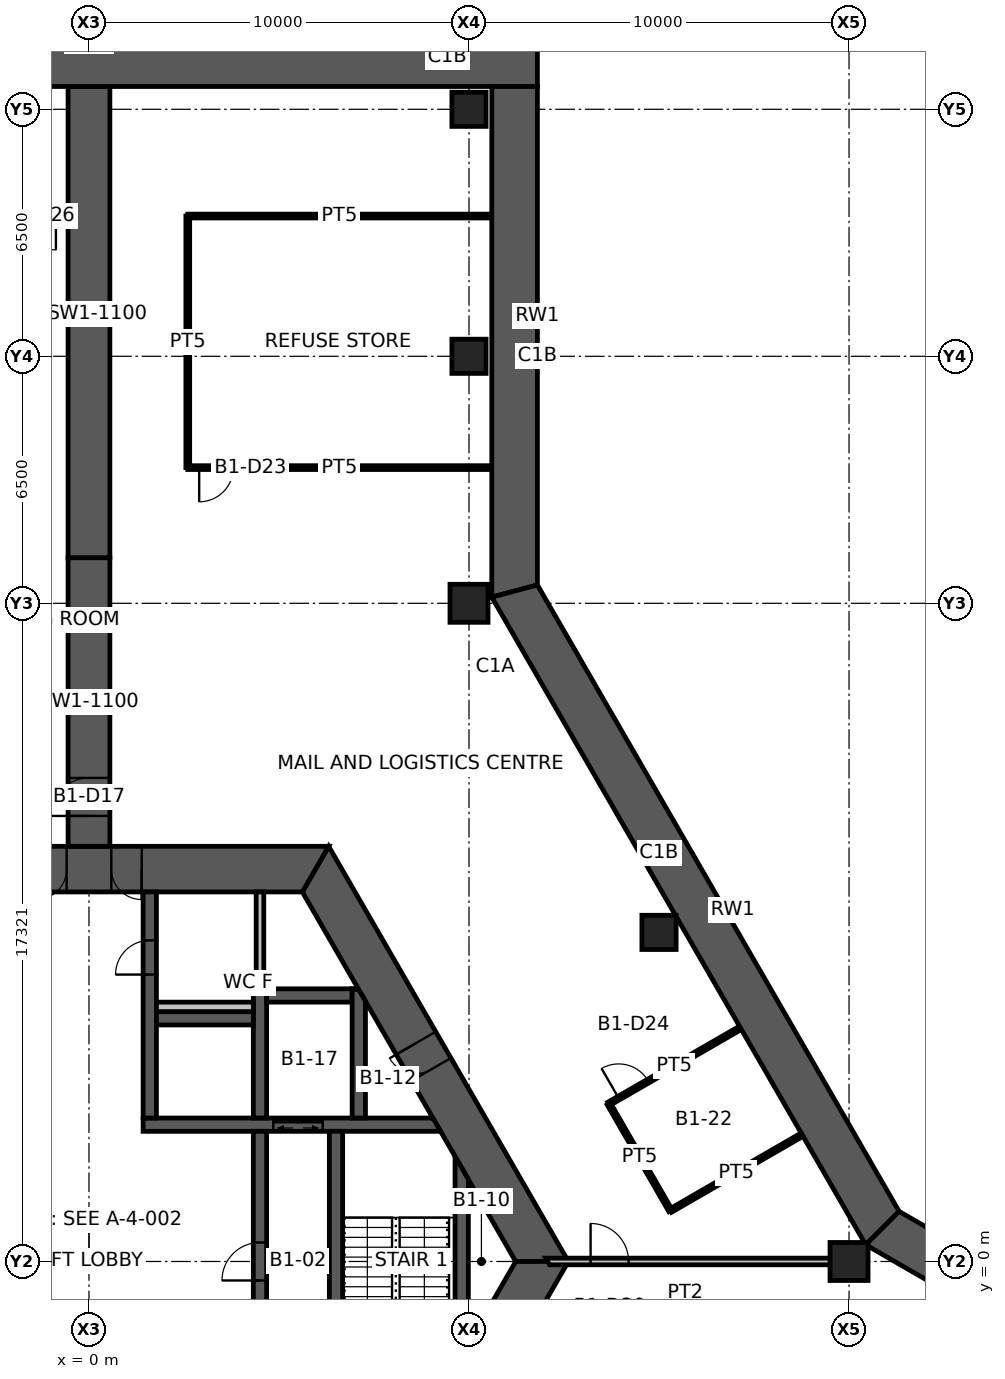
"""IFC4 building model, lengths in metres.
Left out: names, types, materials, properties, quantities, classifications, styles, units other than length and angle.
Written with IfcOpenShell. Run it as: python <this file> out.ifc"""

import sys

from ifc_helpers import new_model, si_unit, direction, frame, frame_2d, origin, origin_2d, place, context, subcontext, project, spatial, polyline, rectangle, hollow_rectangle, outline, extrude, element, fill, save


model = new_model("IFC4")
c1 = context("Model", 3, precision=1e-05, world=origin(), true_north=direction((0.0, 1.0)))
c2 = subcontext(c1, "Body", "Model", "MODEL_VIEW")
j1 = project(units=[si_unit("LENGTHUNIT", "METRE"), si_unit("PLANEANGLEUNIT", "RADIAN")], contexts=[c1])
p1 = place(None, origin())
s1 = spatial("IfcSite", under=j1, at=p1, CompositionType="ELEMENT")
p2 = place(p1, origin())
s2 = spatial("IfcBuilding", under=s1, at=p2, CompositionType="ELEMENT")
p3 = place(p2, frame((0.0, 0.0, -5.0)))
s3 = spatial("IfcBuildingStorey", under=s2, at=p3, CompositionType="ELEMENT", Elevation=-5.0)
for number, where, z_axis, x_axis in (
    (1, (20.0, 0.0, 0.0), (0.0, 0.0, 1.0), (1.0, 0.0, 0.0)),
    (2, (10.0, 17.321, 0.0), (0.0, 0.0, 1.0), (1.0, 0.0, 0.0)),
):
    element("IfcColumn", number, at=place(p3, frame(where, z_axis=z_axis, x_axis=x_axis)), inside=s3, PredefinedType="COLUMN", context=c2, shape_type="SweptSolid", body=[
        extrude(hollow_rectangle(XDim=1.0, YDim=1.0, WallThickness=0.06, at=origin_2d()), origin(), (0.0, 0.0, 1.0), 5.0),
    ])
for number, where, z_axis, x_axis in (
    (3, (15.0, 8.66, 0.0), (0.0, 0.0, 1.0), (1.0, 0.0, 0.0)),
    (4, (10.0, 23.821, 0.0), (0.0, 0.0, 1.0), (1.0, 0.0, 0.0)),
    (5, (10.0, 30.321, 0.0), (0.0, 0.0, 1.0), (1.0, 0.0, 0.0)),
):
    element("IfcColumn", number, at=place(p3, frame(where, z_axis=z_axis, x_axis=x_axis)), inside=s3, PredefinedType="COLUMN", context=c2, shape_type="SweptSolid", body=[
        extrude(hollow_rectangle(XDim=0.9, YDim=0.9, WallThickness=0.05, at=origin_2d()), origin(), (0.0, 0.0, 1.0), 5.0),
    ])
p4 = place(p3, frame((11.922, 0.0, 0.0), z_axis=(0.0, 0.0, 1.0), x_axis=(-0.500004296715, 0.866022923061, 0.0)))
e6 = element("IfcWall", 6, at=p4, inside=s3, PredefinedType="SHEAR", context=c2, shape_type="SweptSolid", body=[
    extrude(outline(polyline([(-0.346, -0.6), (5.835, -0.6), (6.635, -0.6), (12.269, -0.6), (11.576, 0.6), (6.635, 0.6), (5.835, 0.6), (0.346, 0.6), (-0.346, -0.6)])), origin(), (0.0, 0.0, 1.0), 5.0),
])
p5 = place(p4, frame((5.835, 0.0, 0.0)))
e7 = element("IfcOpeningElement", 7, at=p5, cuts=e6, PredefinedType="OPENING", context=c2, shape_type="SweptSolid", body=[
    extrude(rectangle(XDim=0.8, YDim=2.1, at=frame_2d((0.4, 1.05))), frame((0.0, 0.61, 0.0), z_axis=(0.0, -1.0, 0.0), x_axis=(1.0, 0.0, 0.0)), (0.0, 0.0, 1.0), 1.22),
])
p6 = place(p3, frame((5.961, 10.325, 0.0), z_axis=(0.0, 0.0, 1.0), x_axis=(-1.0, 0.0, 0.0)))
e8 = element("IfcWall", 8, at=p6, inside=s3, PredefinedType="SHEAR", context=c2, shape_type="SweptSolid", body=[
    extrude(outline(polyline([(-0.346, -0.6), (4.574, -0.6), (5.374, -0.6), (6.549, -0.6), (7.349, -0.6), (12.269, -0.6), (11.576, 0.6), (7.349, 0.6), (6.549, 0.6), (5.374, 0.6), (4.574, 0.6), (0.346, 0.6), (-0.346, -0.6)])), origin(), (0.0, 0.0, 1.0), 5.0),
])
p7 = place(p6, frame((6.549, 0.0, 0.0)))
e9 = element("IfcOpeningElement", 9, at=p7, cuts=e8, PredefinedType="OPENING", context=c2, shape_type="SweptSolid", body=[
    extrude(rectangle(XDim=0.8, YDim=2.1, at=frame_2d((0.4, 1.05))), frame((0.0, 0.61, 0.0), z_axis=(0.0, -1.0, 0.0), x_axis=(1.0, 0.0, 0.0)), (0.0, 0.0, 1.0), 1.22),
])
p8 = place(p6, frame((4.574, 0.0, 0.0)))
e10 = element("IfcOpeningElement", 10, at=p8, cuts=e8, PredefinedType="OPENING", context=c2, shape_type="SweptSolid", body=[
    extrude(rectangle(XDim=0.8, YDim=2.1, at=frame_2d((0.4, 1.05))), frame((0.0, 0.61, 0.0), z_axis=(0.0, -1.0, 0.0), x_axis=(1.0, 0.0, 0.0)), (0.0, 0.0, 1.0), 1.22),
])
p9 = place(p3, frame((5.961, -10.325, 0.0), z_axis=(0.0, 0.0, 1.0), x_axis=(0.500004296715, 0.866022923061, 0.0)))
e11 = element("IfcWall", 11, at=p9, inside=s3, PredefinedType="SHEAR", context=c2, shape_type="SweptSolid", body=[
    extrude(outline(polyline([(-0.346, -0.6), (3.208, -0.6), (4.009, -0.6), (12.269, -0.6), (11.576, 0.6), (4.009, 0.6), (3.208, 0.6), (0.346, 0.6), (-0.346, -0.6)])), origin(), (0.0, 0.0, 1.0), 5.0),
])
p10 = place(p9, frame((3.208, 0.0, 0.0)))
e12 = element("IfcOpeningElement", 12, at=p10, cuts=e11, PredefinedType="OPENING", context=c2, shape_type="SweptSolid", body=[
    extrude(rectangle(XDim=0.8, YDim=2.1, at=frame_2d((0.4, 1.05))), frame((0.0, 0.61, 0.0), z_axis=(0.0, -1.0, 0.0), x_axis=(1.0, 0.0, 0.0)), (0.0, 0.0, 1.0), 1.22),
])
p11 = place(p3, frame((0.0, 10.925, 0.0), z_axis=(0.0, 0.0, 1.0), x_axis=(0.0, 1.0, 0.0)))
e13 = element("IfcWall", 13, at=p11, inside=s3, PredefinedType="SHEAR", context=c2, shape_type="SweptSolid", body=[
    extrude(rectangle(XDim=7.595, YDim=1.1, at=frame_2d((3.798, 0.0))), origin(), (0.0, 0.0, 1.0), 5.0),
])
p12 = place(p11, frame((0.8, 0.0, 0.0)))
e14 = element("IfcOpeningElement", 14, at=p12, cuts=e13, PredefinedType="OPENING", context=c2, shape_type="SweptSolid", body=[
    extrude(rectangle(XDim=1.0, YDim=2.1, at=frame_2d((0.5, 1.05))), frame((0.0, 0.56, 0.0), z_axis=(0.0, -1.0, 0.0), x_axis=(1.0, 0.0, 0.0)), (0.0, 0.0, 1.0), 1.12),
])
p13 = place(p3, frame((0.0, 18.521, 0.0), z_axis=(0.0, 0.0, 1.0), x_axis=(0.0, 1.0, 0.0)))
e15 = element("IfcWall", 15, at=p13, inside=s3, PredefinedType="SHEAR", context=c2, shape_type="SweptSolid", body=[
    extrude(rectangle(XDim=12.4, YDim=1.1, at=frame_2d((6.2, 0.0))), origin(), (0.0, 0.0, 1.0), 5.0),
])
p14 = place(p3, frame((-11.8, 31.521, 0.0), z_axis=(0.0, 0.0, 1.0), x_axis=(1.0, 0.0, 0.0)))
e16 = element("IfcWall", 16, at=p14, inside=s3, PredefinedType="SOLIDWALL", context=c2, shape_type="SweptSolid", body=[
    extrude(rectangle(XDim=23.6, YDim=1.2, at=frame_2d((11.8, 0.0))), origin(), (0.0, 0.0, 1.0), 5.0),
])
p15 = place(p3, frame((11.2, 30.92, 0.0), z_axis=(0.0, 0.0, 1.0), x_axis=(0.0, -1.0, 0.0)))
e17 = element("IfcWall", 17, at=p15, inside=s3, PredefinedType="SOLIDWALL", context=c2, shape_type="SweptSolid", body=[
    extrude(outline(polyline([(0.0, -0.6), (13.439, -0.6), (13.117, 0.6), (0.0, 0.6), (0.0, -0.6)])), origin(), (0.0, 0.0, 1.0), 5.0),
])
p16 = place(p3, frame((11.2, 17.642, 0.0), z_axis=(0.0, 0.0, 1.0), x_axis=(0.499998307868, -0.866026380735, 0.0)))
e18 = element("IfcWall", 18, at=p16, inside=s3, PredefinedType="SOLIDWALL", context=c2, shape_type="SweptSolid", body=[
    extrude(outline(polyline([(-0.161, -0.6), (19.518, -0.6), (19.196, 0.6), (0.161, 0.6), (-0.161, -0.6)])), origin(), (0.0, 0.0, 1.0), 5.0),
])
p17 = place(p3, frame((20.878, 0.878, 0.0), z_axis=(0.0, 0.0, 1.0), x_axis=(0.866028209229, -0.499995140796, 0.0)))
e19 = element("IfcWall", 19, at=p17, inside=s3, PredefinedType="SOLIDWALL", context=c2, shape_type="SweptSolid", body=[
    extrude(outline(polyline([(-0.161, -0.6), (13.279, -0.6), (13.279, 0.6), (0.161, 0.6), (-0.161, -0.6)])), origin(), (0.0, 0.0, 1.0), 5.0),
])
p18 = place(p3, frame((1.425, 3.6, 0.0), z_axis=(0.0, 0.0, 1.0), x_axis=(1.0, 0.0, 0.0)))
e20 = element("IfcWall", 20, at=p18, inside=s3, PredefinedType="SHEAR", context=c2, shape_type="SweptSolid", body=[
    extrude(outline(polyline([(0.0, -0.175), (3.425, -0.175), (4.725, -0.175), (7.827, -0.175), (7.625, 0.175), (4.725, 0.175), (3.425, 0.175), (0.0, 0.175), (0.0, -0.175)])), origin(), (0.0, 0.0, 1.0), 5.0),
])
p19 = place(p18, frame((3.425, 0.0, 0.0)))
e21 = element("IfcOpeningElement", 21, at=p19, cuts=e20, PredefinedType="OPENING", context=c2, shape_type="SweptSolid", body=[
    extrude(rectangle(XDim=1.3, YDim=2.1, at=frame_2d((0.65, 1.05))), frame((0.0, 0.185, 0.0), z_axis=(0.0, -1.0, 0.0), x_axis=(1.0, 0.0, 0.0)), (0.0, 0.0, 1.0), 0.37),
])
p20 = place(p3, frame((1.6, 3.775, 0.0), z_axis=(0.0, 0.0, 1.0), x_axis=(0.0, 1.0, 0.0)))
e22 = element("IfcWall", 22, at=p20, inside=s3, PredefinedType="SHEAR", context=c2, shape_type="SweptSolid", body=[
    extrude(rectangle(XDim=5.95, YDim=0.35, at=frame_2d((2.975, 0.0))), origin(), (0.0, 0.0, 1.0), 5.0),
])
p21 = place(p20, frame((3.775, 0.0, 0.0)))
e23 = element("IfcOpeningElement", 23, at=p21, cuts=e22, PredefinedType="OPENING", context=c2, shape_type="SweptSolid", body=[
    extrude(rectangle(XDim=0.9, YDim=2.1, at=frame_2d((0.45, 1.05))), frame((0.0, 0.185, 0.0), z_axis=(0.0, -1.0, 0.0), x_axis=(1.0, 0.0, 0.0)), (0.0, 0.0, 1.0), 0.37),
])
p22 = place(p3, frame((4.5, -3.425, 0.0), z_axis=(0.0, 0.0, 1.0), x_axis=(0.0, 1.0, 0.0)))
e24 = element("IfcWall", 24, at=p22, inside=s3, PredefinedType="SHEAR", context=c2, shape_type="SweptSolid", body=[
    extrude(rectangle(XDim=6.85, YDim=0.35, at=frame_2d((3.425, 0.0))), origin(), (0.0, 0.0, 1.0), 5.0),
])
p23 = place(p22, frame((2.925, 0.0, 0.0)))
e25 = element("IfcOpeningElement", 25, at=p23, cuts=e24, PredefinedType="OPENING", context=c2, shape_type="SweptSolid", body=[
    extrude(rectangle(XDim=1.0, YDim=2.1, at=frame_2d((0.5, 1.05))), frame((0.0, 0.185, 0.0), z_axis=(0.0, -1.0, 0.0), x_axis=(1.0, 0.0, 0.0)), (0.0, 0.0, 1.0), 0.37),
])
p24 = place(p3, frame((6.5, -3.425, 0.0), z_axis=(0.0, 0.0, 1.0), x_axis=(0.0, 1.0, 0.0)))
e26 = element("IfcWall", 26, at=p24, inside=s3, PredefinedType="SHEAR", context=c2, shape_type="SweptSolid", body=[
    extrude(rectangle(XDim=6.85, YDim=0.35, at=frame_2d((3.425, 0.0))), origin(), (0.0, 0.0, 1.0), 5.0),
])
p25 = place(p24, frame((0.1, 0.0, 0.0)))
e27 = element("IfcOpeningElement", 27, at=p25, cuts=e26, PredefinedType="OPENING", context=c2, shape_type="SweptSolid", body=[
    extrude(rectangle(XDim=1.0, YDim=2.1, at=frame_2d((0.5, 1.05))), frame((0.0, 0.185, 0.0), z_axis=(0.0, -1.0, 0.0), x_axis=(1.0, 0.0, 0.0)), (0.0, 0.0, 1.0), 0.37),
])
p26 = place(p3, frame((4.5, 3.775, 0.0), z_axis=(0.0, 0.0, 1.0), x_axis=(0.0, 1.0, 0.0)))
e28 = element("IfcWall", 28, at=p26, inside=s3, PredefinedType="SHEAR", context=c2, shape_type="SweptSolid", body=[
    extrude(rectangle(XDim=3.4, YDim=0.35, at=frame_2d((1.7, 0.0))), origin(), (0.0, 0.0, 1.0), 5.0),
])
p27 = place(p3, frame((1.775, 6.4, 0.0), z_axis=(0.0, 0.0, 1.0), x_axis=(1.0, 0.0, 0.0)))
e29 = element("IfcWall", 29, at=p27, inside=s3, PredefinedType="SHEAR", context=c2, shape_type="SweptSolid", body=[
    extrude(rectangle(XDim=2.55, YDim=0.35, at=frame_2d((1.275, 0.0))), origin(), (0.0, 0.0, 1.0), 5.0),
])
p28 = place(p3, frame((4.675, 7.0, 0.0), z_axis=(0.0, 0.0, 1.0), x_axis=(1.0, 0.0, 0.0)))
e30 = element("IfcWall", 30, at=p28, inside=s3, PredefinedType="SHEAR", context=c2, shape_type="SweptSolid", body=[
    extrude(rectangle(XDim=2.25, YDim=0.35, at=frame_2d((1.125, 0.0))), origin(), (0.0, 0.0, 1.0), 5.0),
])
p29 = place(p3, frame((7.1, 3.775, 0.0), z_axis=(0.0, 0.0, 1.0), x_axis=(0.0, 1.0, 0.0)))
e31 = element("IfcWall", 31, at=p29, inside=s3, PredefinedType="SHEAR", context=c2, shape_type="SweptSolid", body=[
    extrude(outline(polyline([(0.0, -0.175), (3.074, -0.175), (3.377, 0.0), (3.4, 0.175), (0.0, 0.175), (0.0, -0.175)])), origin(), (0.0, 0.0, 1.0), 5.0),
])
p30 = place(p3, frame((9.808, -2.462, 0.0), z_axis=(0.0, 0.0, 1.0), x_axis=(0.0, 1.0, 0.0)))
e32 = element("IfcWall", 32, at=p30, inside=s3, PredefinedType="SHEAR", context=c2, shape_type="SweptSolid", body=[
    extrude(outline(polyline([(0.303, -0.175), (4.621, -0.175), (5.228, 0.175), (-0.303, 0.175), (0.303, -0.175)])), origin(), (0.0, 0.0, 1.0), 5.0),
])
p31 = place(p3, frame((4.5, 7.175, 0.0), z_axis=(0.0, 0.0, 1.0), x_axis=(0.0, 1.0, 0.0)))
e33 = element("IfcWall", 33, at=p31, inside=s3, PredefinedType="STANDARD", context=c2, shape_type="SweptSolid", body=[
    extrude(rectangle(XDim=2.55, YDim=0.2, at=frame_2d((1.275, 0.0))), origin(), (0.0, 0.0, 1.0), 5.0),
])
p32 = place(p3, frame((1.775, 6.7, 0.0), z_axis=(0.0, 0.0, 1.0), x_axis=(1.0, 0.0, 0.0)))
e34 = element("IfcWall", 34, at=p32, inside=s3, PredefinedType="PLUMBINGWALL", context=c2, shape_type="SweptSolid", body=[
    extrude(rectangle(XDim=2.55, YDim=0.25, at=frame_2d((1.275, 0.0))), origin(), (0.0, 0.0, 1.0), 5.0),
])
p33 = place(p3, frame((12.07, 0.0, 0.0), z_axis=(0.0, 0.0, 1.0), x_axis=(1.0, 0.0, 0.0)))
e35 = element("IfcWall", 35, at=p33, inside=s3, PredefinedType="PARTITIONING", context=c2, shape_type="SweptSolid", body=[
    extrude(outline(polyline([(0.051, -0.087), (1.129, -0.087), (2.129, -0.087), (7.93, -0.087), (7.93, 0.087), (2.129, 0.087), (1.129, 0.087), (-0.051, 0.087), (0.051, -0.087)])), origin(), (0.0, 0.0, 1.0), 3.8),
])
p34 = place(p33, frame((1.129, 0.0, 0.0)))
e36 = element("IfcOpeningElement", 36, at=p34, cuts=e35, PredefinedType="OPENING", context=c2, shape_type="SweptSolid", body=[
    extrude(rectangle(XDim=1.0, YDim=2.1, at=frame_2d((0.5, 1.05))), frame((0.0, 0.098, 0.0), z_axis=(0.0, -1.0, 0.0), x_axis=(1.0, 0.0, 0.0)), (0.0, 0.0, 1.0), 0.195),
])
p35 = place(p3, frame((2.6, 20.891, 0.0), z_axis=(0.0, 0.0, 1.0), x_axis=(0.0, 1.0, 0.0)))
e37 = element("IfcWall", 37, at=p35, inside=s3, PredefinedType="PARTITIONING", context=c2, shape_type="SweptSolid", body=[
    extrude(rectangle(XDim=6.62, YDim=0.1, at=frame_2d((3.31, 0.0))), origin(), (0.0, 0.0, 1.0), 3.7),
])
p36 = place(p3, frame((2.6, 27.511, 0.0), z_axis=(0.0, 0.0, 1.0), x_axis=(1.0, 0.0, 0.0)))
e38 = element("IfcWall", 38, at=p36, inside=s3, PredefinedType="PARTITIONING", context=c2, shape_type="SweptSolid", body=[
    extrude(rectangle(XDim=7.98, YDim=0.1, at=frame_2d((3.99, 0.0))), origin(), (0.0, 0.0, 1.0), 3.7),
])
p37 = place(p3, frame((10.58, 20.891, 0.0), z_axis=(0.0, 0.0, 1.0), x_axis=(-1.0, 0.0, 0.0)))
e39 = element("IfcWall", 39, at=p37, inside=s3, PredefinedType="PARTITIONING", context=c2, shape_type="SweptSolid", body=[
    extrude(rectangle(XDim=7.98, YDim=0.1, at=frame_2d((3.99, 0.0))), origin(), (0.0, 0.0, 1.0), 3.7),
])
p38 = place(p37, frame((6.78, 0.0, 0.0)))
e40 = element("IfcOpeningElement", 40, at=p38, cuts=e39, PredefinedType="OPENING", context=c2, shape_type="SweptSolid", body=[
    extrude(rectangle(XDim=0.9, YDim=2.1, at=frame_2d((0.45, 1.05))), frame((0.0, 0.06, 0.0), z_axis=(0.0, -1.0, 0.0), x_axis=(1.0, 0.0, 0.0)), (0.0, 0.0, 1.0), 0.12),
])
p39 = place(p3, frame((13.679, 4.149, 0.0), z_axis=(0.0, 0.0, 1.0), x_axis=(0.86599966765, 0.500044573643, 0.0)))
e41 = element("IfcWall", 41, at=p39, inside=s3, PredefinedType="PARTITIONING", context=c2, shape_type="SweptSolid", body=[
    extrude(rectangle(XDim=3.98, YDim=0.1, at=frame_2d((1.99, 0.0))), origin(), (0.0, 0.0, 1.0), 3.7),
])
p40 = place(p39, frame((0.3, 0.0, 0.0)))
e42 = element("IfcOpeningElement", 42, at=p40, cuts=e41, PredefinedType="OPENING", context=c2, shape_type="SweptSolid", body=[
    extrude(rectangle(XDim=0.9, YDim=2.1, at=frame_2d((0.45, 1.05))), frame((0.0, 0.06, 0.0), z_axis=(0.0, -1.0, 0.0), x_axis=(1.0, 0.0, 0.0)), (0.0, 0.0, 1.0), 0.12),
])
p41 = place(p3, frame((15.302, 1.337, 0.0), z_axis=(0.0, 0.0, 1.0), x_axis=(-0.500045780129, 0.865998971001, 0.0)))
e43 = element("IfcWall", 43, at=p41, inside=s3, PredefinedType="PARTITIONING", context=c2, shape_type="SweptSolid", body=[
    extrude(rectangle(XDim=3.246, YDim=0.1, at=frame_2d((1.623, 0.0))), origin(), (0.0, 0.0, 1.0), 3.7),
])
p42 = place(p3, frame((18.765, 3.337, 0.0), z_axis=(0.0, 0.0, 1.0), x_axis=(-0.866017831539, -0.500013115284, 0.0)))
e44 = element("IfcWall", 44, at=p42, inside=s3, PredefinedType="PARTITIONING", context=c2, shape_type="SweptSolid", body=[
    extrude(rectangle(XDim=3.999, YDim=0.1, at=frame_2d((2.0, 0.0))), origin(), (0.0, 0.0, 1.0), 3.7),
])
p43 = place(p3, frame((-0.57, 27.521, 0.0), z_axis=(0.0, 0.0, 1.0), x_axis=(-1.0, 0.0, 0.0)))
e45 = element("IfcWall", 45, at=p43, inside=s3, PredefinedType="PARTITIONING", context=c2, shape_type="SweptSolid", body=[
    extrude(rectangle(XDim=2.034, YDim=0.1, at=frame_2d((1.017, 0.0))), origin(), (0.0, 0.0, 1.0), 3.7),
])
p44 = place(p43, frame((0.3, 0.0, 0.0)))
e46 = element("IfcOpeningElement", 46, at=p44, cuts=e45, PredefinedType="OPENING", context=c2, shape_type="SweptSolid", body=[
    extrude(rectangle(XDim=0.9, YDim=2.1, at=frame_2d((0.45, 1.05))), frame((0.0, 0.06, 0.0), z_axis=(0.0, -1.0, 0.0), x_axis=(1.0, 0.0, 0.0)), (0.0, 0.0, 1.0), 0.12),
])
p45 = place(p7, origin())
e47 = element("IfcDoor", 47, at=p45, inside=s3, OperationType="SINGLE_SWING_RIGHT", PredefinedType="DOOR", context=c2, shape_type="SweptSolid", body=[
    extrude(rectangle(XDim=0.8, YDim=2.1, at=frame_2d((0.4, 1.05))), frame((0.0, 0.025, 0.0), z_axis=(0.0, -1.0, 0.0), x_axis=(1.0, 0.0, 0.0)), (0.0, 0.0, 1.0), 0.05),
])
fill(e9, e47)
p46 = place(p8, origin())
e48 = element("IfcDoor", 48, at=p46, inside=s3, OperationType="SINGLE_SWING_LEFT", PredefinedType="DOOR", context=c2, shape_type="SweptSolid", body=[
    extrude(rectangle(XDim=0.8, YDim=2.1, at=frame_2d((0.4, 1.05))), frame((0.0, 0.025, 0.0), z_axis=(0.0, -1.0, 0.0), x_axis=(1.0, 0.0, 0.0)), (0.0, 0.0, 1.0), 0.05),
])
fill(e10, e48)
p47 = place(p5, origin())
e49 = element("IfcDoor", 49, at=p47, inside=s3, OperationType="SINGLE_SWING_RIGHT", PredefinedType="DOOR", context=c2, shape_type="SweptSolid", body=[
    extrude(rectangle(XDim=0.8, YDim=2.1, at=frame_2d((0.4, 1.05))), frame((0.0, 0.025, 0.0), z_axis=(0.0, -1.0, 0.0), x_axis=(1.0, 0.0, 0.0)), (0.0, 0.0, 1.0), 0.05),
])
fill(e7, e49)
p48 = place(p23, origin())
e50 = element("IfcDoor", 50, at=p48, inside=s3, OperationType="SINGLE_SWING_LEFT", PredefinedType="DOOR", context=c2, shape_type="SweptSolid", body=[
    extrude(rectangle(XDim=1.0, YDim=2.1, at=frame_2d((0.5, 1.05))), frame((0.0, 0.025, 0.0), z_axis=(0.0, -1.0, 0.0), x_axis=(1.0, 0.0, 0.0)), (0.0, 0.0, 1.0), 0.05),
])
fill(e25, e50)
p49 = place(p21, origin())
e51 = element("IfcDoor", 51, at=p49, inside=s3, OperationType="SINGLE_SWING_LEFT", PredefinedType="DOOR", context=c2, shape_type="SweptSolid", body=[
    extrude(rectangle(XDim=0.9, YDim=2.1, at=frame_2d((0.45, 1.05))), frame((0.0, 0.025, 0.0), z_axis=(0.0, -1.0, 0.0), x_axis=(1.0, 0.0, 0.0)), (0.0, 0.0, 1.0), 0.05),
])
fill(e23, e51)
p50 = place(p12, origin())
e52 = element("IfcDoor", 52, at=p50, inside=s3, OperationType="SINGLE_SWING_LEFT", PredefinedType="DOOR", context=c2, shape_type="SweptSolid", body=[
    extrude(rectangle(XDim=1.0, YDim=2.1, at=frame_2d((0.5, 1.05))), frame((0.0, 0.025, 0.0), z_axis=(0.0, -1.0, 0.0), x_axis=(1.0, 0.0, 0.0)), (0.0, 0.0, 1.0), 0.05),
])
fill(e14, e52)
p51 = place(p34, origin())
e53 = element("IfcDoor", 53, at=p51, inside=s3, OperationType="SINGLE_SWING_LEFT", PredefinedType="DOOR", context=c2, shape_type="SweptSolid", body=[
    extrude(rectangle(XDim=1.0, YDim=2.1, at=frame_2d((0.5, 1.05))), frame((0.0, 0.025, 0.0), z_axis=(0.0, -1.0, 0.0), x_axis=(1.0, 0.0, 0.0)), (0.0, 0.0, 1.0), 0.05),
])
fill(e36, e53)
p52 = place(p38, origin())
e54 = element("IfcDoor", 54, at=p52, inside=s3, OperationType="SINGLE_SWING_RIGHT", PredefinedType="DOOR", context=c2, shape_type="SweptSolid", body=[
    extrude(rectangle(XDim=0.9, YDim=2.1, at=frame_2d((0.45, 1.05))), frame((0.0, 0.025, 0.0), z_axis=(0.0, -1.0, 0.0), x_axis=(1.0, 0.0, 0.0)), (0.0, 0.0, 1.0), 0.05),
])
fill(e40, e54)
p53 = place(p40, origin())
e55 = element("IfcDoor", 55, at=p53, inside=s3, OperationType="SINGLE_SWING_LEFT", PredefinedType="DOOR", context=c2, shape_type="SweptSolid", body=[
    extrude(rectangle(XDim=0.9, YDim=2.1, at=frame_2d((0.45, 1.05))), frame((0.0, 0.025, 0.0), z_axis=(0.0, -1.0, 0.0), x_axis=(1.0, 0.0, 0.0)), (0.0, 0.0, 1.0), 0.05),
])
fill(e42, e55)
p54 = place(p44, origin())
e56 = element("IfcDoor", 56, at=p54, inside=s3, OperationType="SINGLE_SWING_LEFT", PredefinedType="DOOR", context=c2, shape_type="SweptSolid", body=[
    extrude(rectangle(XDim=0.9, YDim=2.1, at=frame_2d((0.45, 1.05))), frame((0.0, 0.025, 0.0), z_axis=(0.0, -1.0, 0.0), x_axis=(1.0, 0.0, 0.0)), (0.0, 0.0, 1.0), 0.05),
])
fill(e46, e56)
p55 = place(p19, origin())
e57 = element("IfcDoor", 57, at=p55, inside=s3, OperationType="DOUBLE_DOOR_SLIDING", PredefinedType="DOOR", context=c2, shape_type="SweptSolid", body=[
    extrude(rectangle(XDim=1.3, YDim=2.1, at=frame_2d((0.65, 1.05))), frame((0.0, 0.025, 0.0), z_axis=(0.0, -1.0, 0.0), x_axis=(1.0, 0.0, 0.0)), (0.0, 0.0, 1.0), 0.05),
])
fill(e21, e57)
save(model, sys.argv[1])
